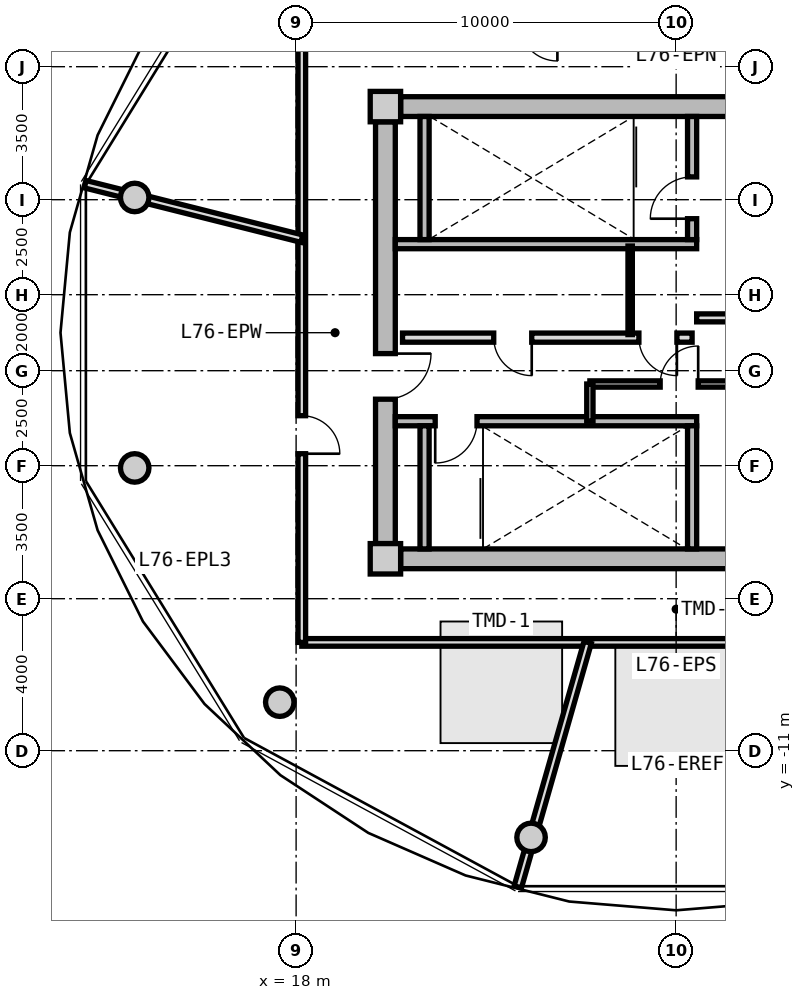
"""IFC4 building model, lengths in metres.
Left out: names, types, materials, properties, quantities, classifications, styles, units other than length and angle.
Written with IfcOpenShell. Run it as: python <this file> out.ifc"""

import sys

from ifc_helpers import new_model, si_unit, direction, frame, frame_2d, origin, origin_2d, place, context, subcontext, project, spatial, rectangle, circle, extrude, source, transform, mapped, element, fill, save


model = new_model("IFC4")
c1 = context("Model", 3, precision=1e-05, world=origin(), true_north=direction((0.0, 1.0)))
c2 = subcontext(c1, "Body", "Model", "MODEL_VIEW")
j1 = project(units=[si_unit("LENGTHUNIT", "METRE"), si_unit("PLANEANGLEUNIT", "RADIAN")], contexts=[c1])
p1 = place(None, origin())
s1 = spatial("IfcSite", under=j1, at=p1, CompositionType="ELEMENT")
p2 = place(p1, origin())
s2 = spatial("IfcBuilding", under=s1, at=p2, CompositionType="ELEMENT")
p3 = place(p2, frame((0.0, 0.0, 244.4)))
s3 = spatial("IfcBuildingStorey", under=s2, at=p3, CompositionType="ELEMENT", Elevation=244.4)
m1 = source(origin(), c2, "Body", "SweptSolid", [
    extrude(rectangle(XDim=0.8, YDim=0.8, at=origin_2d()), origin(), (0.0, 0.0, 1.0), 5.45),
])
for number, where, z_axis, x_axis in (
    (1, (20.35, -5.95, 0.0), (0.0, 0.0, 1.0), (1.0, 0.0, 0.0)),
    (2, (20.35, 5.95, 0.0), (0.0, 0.0, 1.0), (1.0, 0.0, 0.0)),
):
    element("IfcColumn", number, at=place(p3, frame(where, z_axis=z_axis, x_axis=x_axis)), inside=s3, PredefinedType="COLUMN", context=c2, shape_type="MappedRepresentation", body=[
        mapped(m1, transform((0.0, 0.0, 0.0), x_axis=(1.0, 0.0, 0.0), y_axis=(0.0, 1.0, 0.0), z_axis=(0.0, 0.0, 1.0), scale=1.0)),
    ])
m2 = source(origin(), c2, "Body", "SweptSolid", [
    extrude(rectangle(XDim=14.5, YDim=0.52, at=frame_2d((7.25, 0.0))), origin(), (0.0, 0.0, 1.0), 5.175),
])
for number, where, z_axis, x_axis in (
    (3, (20.75, 5.95, 0.0), (0.0, 0.0, 1.0), (1.0, 0.0, 0.0)),
    (4, (35.25, -5.95, 0.0), (0.0, 0.0, 1.0), (-1.0, 0.0, 0.0)),
):
    element("IfcWall", number, at=place(p3, frame(where, z_axis=z_axis, x_axis=x_axis)), inside=s3, PredefinedType="SHEAR", context=c2, shape_type="MappedRepresentation", body=[
        mapped(m2, transform((0.0, 0.0, 0.0), x_axis=(1.0, 0.0, 0.0), y_axis=(0.0, 1.0, 0.0), z_axis=(0.0, 0.0, 1.0), scale=1.0)),
    ])
m3 = source(origin(), c2, "Body", "SweptSolid", [
    extrude(rectangle(XDim=11.1, YDim=0.52, at=frame_2d((5.55, 0.0))), origin(), (0.0, 0.0, 1.0), 5.175),
])
p4 = place(p3, frame((20.35, -5.55, 0.0), z_axis=(0.0, 0.0, 1.0), x_axis=(0.0, 1.0, 0.0)))
e5 = element("IfcWall", 5, at=p4, inside=s3, PredefinedType="SHEAR", context=c2, shape_type="MappedRepresentation", body=[
    mapped(m3, transform((0.0, 0.0, 0.0), x_axis=(1.0, 0.0, 0.0), y_axis=(0.0, 1.0, 0.0), z_axis=(0.0, 0.0, 1.0), scale=1.0)),
])
p5 = place(p4, frame((3.8, 0.0, 0.0)))
e6 = element("IfcOpeningElement", 6, at=p5, cuts=e5, PredefinedType="OPENING", context=c2, shape_type="SweptSolid", body=[
    extrude(rectangle(XDim=1.2, YDim=2.15, at=frame_2d((0.6, 1.075))), frame((0.0, 0.27, 0.0), z_axis=(0.0, -1.0, 0.0), x_axis=(1.0, 0.0, 0.0)), (0.0, 0.0, 1.0), 0.54),
])
m4 = source(origin(), c2, "Body", "SweptSolid", [
    extrude(circle(Radius=0.375, at=origin_2d()), origin(), (0.0, 0.0, 1.0), 5.45),
])
for number, where, z_axis, x_axis in (
    (7, (13.753, 3.559, 0.0), (0.0, 0.0, 1.0), (1.0, 0.0, 0.0)),
    (8, (13.753, -3.559, 0.0), (0.0, 0.0, 1.0), (1.0, 0.0, 0.0)),
    (9, (17.57, -9.723, 0.0), (0.0, 0.0, 1.0), (1.0, 0.0, 0.0)),
    (10, (24.182, -13.281, 0.0), (0.0, 0.0, 1.0), (1.0, 0.0, 0.0)),
):
    element("IfcColumn", number, at=place(p3, frame(where, z_axis=z_axis, x_axis=x_axis)), inside=s3, PredefinedType="COLUMN", context=c2, shape_type="MappedRepresentation", body=[
        mapped(m4, transform((0.0, 0.0, 0.0), x_axis=(1.0, 0.0, 0.0), y_axis=(0.0, 1.0, 0.0), z_axis=(0.0, 0.0, 1.0), scale=1.0)),
    ])
m5 = source(origin(), c2, "Body", "SweptSolid", [
    extrude(rectangle(XDim=7.93, YDim=0.24, at=frame_2d((3.965, 0.0))), origin(), (0.0, 0.0, 1.0), 5.175),
])
p6 = place(p3, frame((20.61, 2.33, 0.0), z_axis=(0.0, 0.0, 1.0), x_axis=(1.0, 0.0, 0.0)))
e11 = element("IfcWall", 11, at=p6, inside=s3, PredefinedType="PARTITIONING", context=c2, shape_type="MappedRepresentation", body=[
    mapped(m5, transform((0.0, 0.0, 0.0), x_axis=(1.0, 0.0, 0.0), y_axis=(0.0, 1.0, 0.0), z_axis=(0.0, 0.0, 1.0), scale=1.0)),
])
m6 = source(origin(), c2, "Body", "SweptSolid", [
    extrude(rectangle(XDim=3.24, YDim=0.24, at=frame_2d((1.62, 0.0))), origin(), (0.0, 0.0, 1.0), 5.175),
])
p7 = place(p3, frame((21.38, 2.45, 0.0), z_axis=(0.0, 0.0, 1.0), x_axis=(0.0, 1.0, 0.0)))
e12 = element("IfcWall", 12, at=p7, inside=s3, PredefinedType="PARTITIONING", context=c2, shape_type="MappedRepresentation", body=[
    mapped(m6, transform((0.0, 0.0, 0.0), x_axis=(1.0, 0.0, 0.0), y_axis=(0.0, 1.0, 0.0), z_axis=(0.0, 0.0, 1.0), scale=1.0)),
])
p8 = place(p3, frame((28.42, 2.45, 0.0), z_axis=(0.0, 0.0, 1.0), x_axis=(0.0, 1.0, 0.0)))
e13 = element("IfcWall", 13, at=p8, inside=s3, PredefinedType="PARTITIONING", context=c2, shape_type="MappedRepresentation", body=[
    mapped(m6, transform((0.0, 0.0, 0.0), x_axis=(1.0, 0.0, 0.0), y_axis=(0.0, 1.0, 0.0), z_axis=(0.0, 0.0, 1.0), scale=1.0)),
])
p9 = place(p8, frame((0.55, 0.0, 0.0)))
e14 = element("IfcOpeningElement", 14, at=p9, cuts=e13, PredefinedType="OPENING", context=c2, shape_type="SweptSolid", body=[
    extrude(rectangle(XDim=1.1, YDim=2.15, at=frame_2d((0.55, 1.075))), frame((0.0, 0.13, 0.0), z_axis=(0.0, -1.0, 0.0), x_axis=(1.0, 0.0, 0.0)), (0.0, 0.0, 1.0), 0.26),
])
p10 = place(p3, frame((20.61, -2.33, 0.0), z_axis=(0.0, 0.0, 1.0), x_axis=(1.0, 0.0, 0.0)))
e15 = element("IfcWall", 15, at=p10, inside=s3, PredefinedType="PARTITIONING", context=c2, shape_type="MappedRepresentation", body=[
    mapped(m5, transform((0.0, 0.0, 0.0), x_axis=(1.0, 0.0, 0.0), y_axis=(0.0, 1.0, 0.0), z_axis=(0.0, 0.0, 1.0), scale=1.0)),
])
p11 = place(p10, frame((1.05, 0.0, 0.0)))
e16 = element("IfcOpeningElement", 16, at=p11, cuts=e15, PredefinedType="OPENING", context=c2, shape_type="SweptSolid", body=[
    extrude(rectangle(XDim=1.1, YDim=2.15, at=frame_2d((0.55, 1.075))), frame((0.0, 0.13, 0.0), z_axis=(0.0, -1.0, 0.0), x_axis=(1.0, 0.0, 0.0)), (0.0, 0.0, 1.0), 0.26),
])
for number, where, z_axis, x_axis in (
    (17, (21.38, -5.69, 0.0), (0.0, 0.0, 1.0), (0.0, 1.0, 0.0)),
    (18, (28.42, -5.69, 0.0), (0.0, 0.0, 1.0), (0.0, 1.0, 0.0)),
):
    element("IfcWall", number, at=place(p3, frame(where, z_axis=z_axis, x_axis=x_axis)), inside=s3, PredefinedType="PARTITIONING", context=c2, shape_type="MappedRepresentation", body=[
        mapped(m6, transform((0.0, 0.0, 0.0), x_axis=(1.0, 0.0, 0.0), y_axis=(0.0, 1.0, 0.0), z_axis=(0.0, 0.0, 1.0), scale=1.0)),
    ])
m7 = source(origin(), c2, "Body", "SweptSolid", [
    extrude(rectangle(XDim=6.66, YDim=0.21, at=frame_2d((3.33, 0.0))), origin(), (0.0, 0.0, 1.0), 5.16),
])
p12 = place(p3, frame((28.54, 0.39, 0.0), z_axis=(0.0, 0.0, 1.0), x_axis=(1.0, 0.0, 0.0)))
e19 = element("IfcWall", 19, at=p12, inside=s3, PredefinedType="PARTITIONING", context=c2, shape_type="MappedRepresentation", body=[
    mapped(m7, transform((0.0, 0.0, 0.0), x_axis=(1.0, 0.0, 0.0), y_axis=(0.0, 1.0, 0.0), z_axis=(0.0, 0.0, 1.0), scale=1.0)),
])
p13 = place(p12, frame((1.0, 0.0, 0.0)))
e20 = element("IfcOpeningElement", 20, at=p13, cuts=e19, PredefinedType="OPENING", context=c2, shape_type="SweptSolid", body=[
    extrude(rectangle(XDim=1.2, YDim=2.15, at=frame_2d((0.6, 1.075))), frame((0.0, 0.115, 0.0), z_axis=(0.0, -1.0, 0.0), x_axis=(1.0, 0.0, 0.0)), (0.0, 0.0, 1.0), 0.23),
])
m8 = source(origin(), c2, "Body", "SweptSolid", [
    extrude(rectangle(XDim=7.62, YDim=0.24, at=frame_2d((3.81, 0.0))), origin(), (0.0, 0.0, 1.0), 5.16),
])
p14 = place(p3, frame((20.8, -0.13, 0.0), z_axis=(0.0, 0.0, 1.0), x_axis=(1.0, 0.0, 0.0)))
e21 = element("IfcWall", 21, at=p14, inside=s3, PredefinedType="PARTITIONING", context=c2, shape_type="MappedRepresentation", body=[
    mapped(m8, transform((0.0, 0.0, 0.0), x_axis=(1.0, 0.0, 0.0), y_axis=(0.0, 1.0, 0.0), z_axis=(0.0, 0.0, 1.0), scale=1.0)),
])
p15 = place(p14, frame((6.22, 0.0, 0.0)))
e22 = element("IfcOpeningElement", 22, at=p15, cuts=e21, PredefinedType="OPENING", context=c2, shape_type="SweptSolid", body=[
    extrude(rectangle(XDim=1.0, YDim=2.1, at=frame_2d((0.5, 1.05))), frame((0.0, 0.13, 0.0), z_axis=(0.0, -1.0, 0.0), x_axis=(1.0, 0.0, 0.0)), (0.0, 0.0, 1.0), 0.26),
])
p16 = place(p14, frame((2.4, 0.0, 0.0)))
e23 = element("IfcOpeningElement", 23, at=p16, cuts=e21, PredefinedType="OPENING", context=c2, shape_type="SweptSolid", body=[
    extrude(rectangle(XDim=1.0, YDim=2.1, at=frame_2d((0.5, 1.05))), frame((0.0, 0.13, 0.0), z_axis=(0.0, -1.0, 0.0), x_axis=(1.0, 0.0, 0.0)), (0.0, 0.0, 1.0), 0.26),
])
m9 = source(origin(), c2, "Body", "SweptSolid", [
    extrude(rectangle(XDim=2.33, YDim=0.115, at=frame_2d((1.165, 0.0))), origin(), (0.0, 0.0, 1.0), 5.16),
])
p17 = place(p3, frame((26.79, -0.05, 0.0), z_axis=(0.0, 0.0, 1.0), x_axis=(0.0, 1.0, 0.0)))
e24 = element("IfcWall", 24, at=p17, inside=s3, PredefinedType="PARTITIONING", context=c2, shape_type="MappedRepresentation", body=[
    mapped(m9, transform((0.0, 0.0, 0.0), x_axis=(1.0, 0.0, 0.0), y_axis=(0.0, 1.0, 0.0), z_axis=(0.0, 0.0, 1.0), scale=1.0)),
])
m10 = source(origin(), c2, "Body", "SweptSolid", [
    extrude(rectangle(XDim=4.77, YDim=0.165, at=frame_2d((2.385, 0.0))), origin(), (0.0, 0.0, 1.0), 5.16),
])
p18 = place(p3, frame((25.73, -1.35, 0.0), z_axis=(0.0, 0.0, 1.0), x_axis=(1.0, 0.0, 0.0)))
e25 = element("IfcWall", 25, at=p18, inside=s3, PredefinedType="PARTITIONING", context=c2, shape_type="MappedRepresentation", body=[
    mapped(m10, transform((0.0, 0.0, 0.0), x_axis=(1.0, 0.0, 0.0), y_axis=(0.0, 1.0, 0.0), z_axis=(0.0, 0.0, 1.0), scale=1.0)),
])
p19 = place(p18, frame((1.85, 0.0, 0.0)))
e26 = element("IfcOpeningElement", 26, at=p19, cuts=e25, PredefinedType="OPENING", context=c2, shape_type="SweptSolid", body=[
    extrude(rectangle(XDim=1.0, YDim=2.1, at=frame_2d((0.5, 1.05))), frame((0.0, 0.093, 0.0), z_axis=(0.0, -1.0, 0.0), x_axis=(1.0, 0.0, 0.0)), (0.0, 0.0, 1.0), 0.185),
])
m11 = source(origin(), c2, "Body", "SweptSolid", [
    extrude(rectangle(XDim=0.98, YDim=0.165, at=frame_2d((0.49, 0.0))), origin(), (0.0, 0.0, 1.0), 5.16),
])
p20 = place(p3, frame((25.73, -2.33, 0.0), z_axis=(0.0, 0.0, 1.0), x_axis=(0.0, 1.0, 0.0)))
e27 = element("IfcWall", 27, at=p20, inside=s3, PredefinedType="PARTITIONING", context=c2, shape_type="MappedRepresentation", body=[
    mapped(m11, transform((0.0, 0.0, 0.0), x_axis=(1.0, 0.0, 0.0), y_axis=(0.0, 1.0, 0.0), z_axis=(0.0, 0.0, 1.0), scale=1.0)),
])
m12 = source(origin(), c2, "Body", "SweptSolid", [
    extrude(rectangle(XDim=19.7, YDim=0.2, at=frame_2d((9.85, 0.0))), origin(), (0.0, 0.0, 1.0), 5.16),
])
p21 = place(p3, frame((37.85, -8.15, 0.0), z_axis=(0.0, 0.0, 1.0), x_axis=(-1.0, 0.0, 0.0)))
e28 = element("IfcWall", 28, at=p21, inside=s3, PredefinedType="PARTITIONING", context=c2, shape_type="MappedRepresentation", body=[
    mapped(m12, transform((0.0, 0.0, 0.0), x_axis=(1.0, 0.0, 0.0), y_axis=(0.0, 1.0, 0.0), z_axis=(0.0, 0.0, 1.0), scale=1.0)),
])
p22 = place(p21, frame((5.725, 0.0, 0.0)))
e29 = element("IfcOpeningElement", 29, at=p22, cuts=e28, PredefinedType="OPENING", context=c2, shape_type="SweptSolid", body=[
    extrude(rectangle(XDim=1.0, YDim=2.1, at=frame_2d((0.5, 1.05))), frame((0.0, 0.11, 0.0), z_axis=(0.0, -1.0, 0.0), x_axis=(1.0, 0.0, 0.0)), (0.0, 0.0, 1.0), 0.22),
])
m13 = source(origin(), c2, "Body", "SweptSolid", [
    extrude(rectangle(XDim=16.3, YDim=0.2, at=frame_2d((8.15, 0.0))), origin(), (0.0, 0.0, 1.0), 5.16),
])
p23 = place(p3, frame((18.15, -8.15, 0.0), z_axis=(0.0, 0.0, 1.0), x_axis=(0.0, 1.0, 0.0)))
e30 = element("IfcWall", 30, at=p23, inside=s3, PredefinedType="PARTITIONING", context=c2, shape_type="MappedRepresentation", body=[
    mapped(m13, transform((0.0, 0.0, 0.0), x_axis=(1.0, 0.0, 0.0), y_axis=(0.0, 1.0, 0.0), z_axis=(0.0, 0.0, 1.0), scale=1.0)),
])
p24 = place(p23, frame((4.966, 0.0, 0.0)))
e31 = element("IfcOpeningElement", 31, at=p24, cuts=e30, PredefinedType="OPENING", context=c2, shape_type="SweptSolid", body=[
    extrude(rectangle(XDim=1.0, YDim=2.1, at=frame_2d((0.5, 1.05))), frame((0.0, 0.11, 0.0), z_axis=(0.0, -1.0, 0.0), x_axis=(1.0, 0.0, 0.0)), (0.0, 0.0, 1.0), 0.22),
])
m14 = source(origin(), c2, "Body", "SweptSolid", [
    extrude(rectangle(XDim=6.693, YDim=0.2, at=frame_2d((3.347, 0.0))), origin(), (0.0, 0.0, 1.0), 4.76),
])
p25 = place(p3, frame((25.672, -8.15, 0.0), z_axis=(0.0, 0.0, 1.0), x_axis=(-0.2747066748, -0.96152807698, 0.0)))
e32 = element("IfcWall", 32, at=p25, inside=s3, PredefinedType="PARTITIONING", context=c2, shape_type="MappedRepresentation", body=[
    mapped(m14, transform((0.0, 0.0, 0.0), x_axis=(1.0, 0.0, 0.0), y_axis=(0.0, 1.0, 0.0), z_axis=(0.0, 0.0, 1.0), scale=1.0)),
])
m15 = source(origin(), c2, "Body", "SweptSolid", [
    extrude(rectangle(XDim=5.879, YDim=0.2, at=frame_2d((2.939, 0.0))), origin(), (0.0, 0.0, 1.0), 4.76),
])
p26 = place(p3, frame((18.15, 2.475, 0.0), z_axis=(0.0, 0.0, 1.0), x_axis=(-0.96984127658, 0.24373735504, 0.0)))
e33 = element("IfcWall", 33, at=p26, inside=s3, PredefinedType="PARTITIONING", context=c2, shape_type="MappedRepresentation", body=[
    mapped(m15, transform((0.0, 0.0, 0.0), x_axis=(1.0, 0.0, 0.0), y_axis=(0.0, 1.0, 0.0), z_axis=(0.0, 0.0, 1.0), scale=1.0)),
])
m16 = source(origin(), c2, "Body", "SweptSolid", [
    extrude(rectangle(XDim=1.1, YDim=2.15, at=frame_2d((0.55, 1.075))), frame((0.0, 0.025, 0.0), z_axis=(0.0, -1.0, 0.0), x_axis=(1.0, 0.0, 0.0)), (0.0, 0.0, 1.0), 0.05),
])
p27 = place(p9, origin())
e34 = element("IfcDoor", 34, at=p27, inside=s3, OperationType="SINGLE_SWING_LEFT", PredefinedType="DOOR", context=c2, shape_type="MappedRepresentation", body=[
    mapped(m16, transform((0.0, 0.0, 0.0), x_axis=(1.0, 0.0, 0.0), y_axis=(0.0, 1.0, 0.0), z_axis=(0.0, 0.0, 1.0), scale=1.0)),
])
fill(e14, e34)
p28 = place(p11, frame((1.1, 0.0, 0.0), z_axis=(0.0, 0.0, 1.0), x_axis=(-1.0, 0.0, 0.0)))
e35 = element("IfcDoor", 35, at=p28, inside=s3, OperationType="SINGLE_SWING_RIGHT", PredefinedType="DOOR", context=c2, shape_type="MappedRepresentation", body=[
    mapped(m16, transform((0.0, 0.0, 0.0), x_axis=(1.0, 0.0, 0.0), y_axis=(0.0, 1.0, 0.0), z_axis=(0.0, 0.0, 1.0), scale=1.0)),
])
fill(e16, e35)
m17 = source(origin(), c2, "Body", "SweptSolid", [
    extrude(rectangle(XDim=1.2, YDim=2.15, at=frame_2d((0.6, 1.075))), frame((0.0, 0.025, 0.0), z_axis=(0.0, -1.0, 0.0), x_axis=(1.0, 0.0, 0.0)), (0.0, 0.0, 1.0), 0.05),
])
p29 = place(p5, frame((1.2, 0.0, 0.0), z_axis=(0.0, 0.0, 1.0), x_axis=(-1.0, 0.0, 0.0)))
e36 = element("IfcDoor", 36, at=p29, inside=s3, OperationType="SINGLE_SWING_LEFT", PredefinedType="DOOR", context=c2, shape_type="MappedRepresentation", body=[
    mapped(m17, transform((0.0, 0.0, 0.0), x_axis=(1.0, 0.0, 0.0), y_axis=(0.0, 1.0, 0.0), z_axis=(0.0, 0.0, 1.0), scale=1.0)),
])
fill(e6, e36)
m18 = source(origin(), c2, "Body", "SweptSolid", [
    extrude(rectangle(XDim=1.0, YDim=2.1, at=frame_2d((0.5, 1.05))), frame((0.0, 0.025, 0.0), z_axis=(0.0, -1.0, 0.0), x_axis=(1.0, 0.0, 0.0)), (0.0, 0.0, 1.0), 0.05),
])
p30 = place(p15, frame((1.0, 0.0, 0.0), z_axis=(0.0, 0.0, 1.0), x_axis=(-1.0, 0.0, 0.0)))
e37 = element("IfcDoor", 37, at=p30, inside=s3, OperationType="SINGLE_SWING_LEFT", PredefinedType="DOOR", context=c2, shape_type="MappedRepresentation", body=[
    mapped(m18, transform((0.0, 0.0, 0.0), x_axis=(1.0, 0.0, 0.0), y_axis=(0.0, 1.0, 0.0), z_axis=(0.0, 0.0, 1.0), scale=1.0)),
])
fill(e22, e37)
p31 = place(p16, frame((1.0, 0.0, 0.0), z_axis=(0.0, 0.0, 1.0), x_axis=(-1.0, 0.0, 0.0)))
e38 = element("IfcDoor", 38, at=p31, inside=s3, OperationType="SINGLE_SWING_LEFT", PredefinedType="DOOR", context=c2, shape_type="MappedRepresentation", body=[
    mapped(m18, transform((0.0, 0.0, 0.0), x_axis=(1.0, 0.0, 0.0), y_axis=(0.0, 1.0, 0.0), z_axis=(0.0, 0.0, 1.0), scale=1.0)),
])
fill(e23, e38)
p32 = place(p19, origin())
e39 = element("IfcDoor", 39, at=p32, inside=s3, OperationType="SINGLE_SWING_RIGHT", PredefinedType="DOOR", context=c2, shape_type="MappedRepresentation", body=[
    mapped(m18, transform((0.0, 0.0, 0.0), x_axis=(1.0, 0.0, 0.0), y_axis=(0.0, 1.0, 0.0), z_axis=(0.0, 0.0, 1.0), scale=1.0)),
])
fill(e26, e39)
p33 = place(p24, frame((1.0, 0.0, 0.0), z_axis=(0.0, 0.0, 1.0), x_axis=(-1.0, 0.0, 0.0)))
e40 = element("IfcDoor", 40, at=p33, inside=s3, OperationType="SINGLE_SWING_RIGHT", PredefinedType="DOOR", context=c2, shape_type="MappedRepresentation", body=[
    mapped(m18, transform((0.0, 0.0, 0.0), x_axis=(1.0, 0.0, 0.0), y_axis=(0.0, 1.0, 0.0), z_axis=(0.0, 0.0, 1.0), scale=1.0)),
])
fill(e31, e40)
save(model, sys.argv[1])
